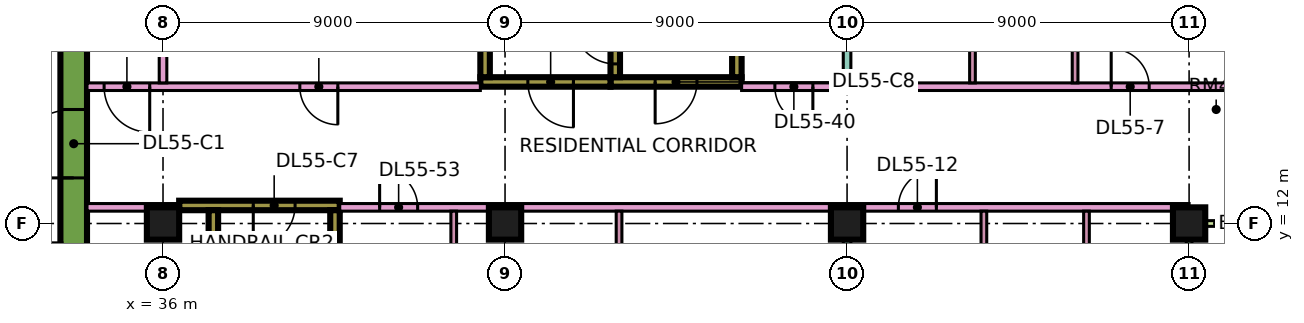
"""IFC4 building model, lengths in metres.
Left out: names, types, materials, properties, quantities, classifications, styles, units other than length and angle.
Written with IfcOpenShell. Run it as: python <this file> out.ifc"""

import sys

from ifc_helpers import new_model, si_unit, direction, frame, frame_2d, origin, origin_2d, place, context, subcontext, project, spatial, rectangle, extrude, element, fill, save


model = new_model("IFC4")
c1 = context("Model", 3, precision=1e-05, world=origin(), true_north=direction((0.0, 1.0)))
c2 = subcontext(c1, "Body", "Model", "MODEL_VIEW")
j1 = project(units=[si_unit("LENGTHUNIT", "METRE"), si_unit("PLANEANGLEUNIT", "RADIAN")], contexts=[c1])
p1 = place(None, origin())
s1 = spatial("IfcSite", under=j1, at=p1, CompositionType="ELEMENT")
p2 = place(p1, origin())
s2 = spatial("IfcBuilding", under=s1, at=p2, CompositionType="ELEMENT")
p3 = place(p2, frame((0.0, 0.0, 234.15)))
s3 = spatial("IfcBuildingStorey", under=s2, at=p3, CompositionType="ELEMENT", Elevation=234.15)
for number, where, z_axis, x_axis in (
    (1, (36.0, 12.0, 0.0), (0.0, 0.0, 1.0), (1.0, 0.0, 0.0)),
    (2, (45.0, 12.0, 0.0), (0.0, 0.0, 1.0), (1.0, 0.0, 0.0)),
    (3, (54.0, 12.0, 0.0), (0.0, 0.0, 1.0), (1.0, 0.0, 0.0)),
    (4, (63.0, 12.0, 0.0), (0.0, 0.0, 1.0), (1.0, 0.0, 0.0)),
):
    element("IfcColumn", number, at=place(p3, frame(where, z_axis=z_axis, x_axis=x_axis)), inside=s3, PredefinedType="COLUMN", context=c2, shape_type="SweptSolid", body=[
        extrude(rectangle(XDim=0.85, YDim=0.85, at=origin_2d()), origin(), (0.0, 0.0, 1.0), 3.75),
    ])
p4 = place(p3, frame((33.65, 7.7, 0.0), z_axis=(0.0, 0.0, 1.0), x_axis=(0.0, 1.0, 0.0)))
e5 = element("IfcWall", 5, at=p4, inside=s3, PredefinedType="SHEAR", context=c2, shape_type="SweptSolid", body=[
    extrude(rectangle(XDim=11.6, YDim=0.7, at=frame_2d((5.8, 0.0))), origin(), (0.0, 0.0, 1.0), 3.75),
])
p5 = place(p4, frame((5.5, 0.0, 0.0)))
e6 = element("IfcOpeningElement", 6, at=p5, cuts=e5, PredefinedType="OPENING", context=c2, shape_type="SweptSolid", body=[
    extrude(rectangle(XDim=1.8, YDim=2.4, at=frame_2d((0.9, 1.2))), frame((0.0, 0.36, 0.0), z_axis=(0.0, -1.0, 0.0), x_axis=(1.0, 0.0, 0.0)), (0.0, 0.0, 1.0), 0.72),
])
p6 = place(p3, frame((36.425, 12.475, 0.0), z_axis=(0.0, 0.0, 1.0), x_axis=(1.0, 0.0, 0.0)))
e7 = element("IfcWall", 7, at=p6, inside=s3, PredefinedType="SHEAR", context=c2, shape_type="SweptSolid", body=[
    extrude(rectangle(XDim=4.225, YDim=0.25, at=frame_2d((2.112, 0.0))), origin(), (0.0, 0.0, 1.0), 3.75),
])
p7 = place(p6, frame((1.95, 0.0, 0.0)))
e8 = element("IfcOpeningElement", 8, at=p7, cuts=e7, PredefinedType="OPENING", context=c2, shape_type="SweptSolid", body=[
    extrude(rectangle(XDim=1.1, YDim=2.2, at=frame_2d((0.55, 1.1))), frame((0.0, 0.135, 0.0), z_axis=(0.0, -1.0, 0.0), x_axis=(1.0, 0.0, 0.0)), (0.0, 0.0, 1.0), 0.27),
])
for number, where, z_axis, x_axis in (
    (9, (37.325, 5.85, 0.0), (0.0, 0.0, 1.0), (0.0, 1.0, 0.0)),
    (10, (40.525, 5.85, 0.0), (0.0, 0.0, 1.0), (0.0, 1.0, 0.0)),
):
    element("IfcWall", number, at=place(p3, frame(where, z_axis=z_axis, x_axis=x_axis)), inside=s3, PredefinedType="SHEAR", context=c2, shape_type="SweptSolid", body=[
        extrude(rectangle(XDim=6.5, YDim=0.25, at=frame_2d((3.25, 0.0))), origin(), (0.0, 0.0, 1.0), 3.75),
    ])
p8 = place(p3, frame((47.775, 15.725, 0.0), z_axis=(0.0, 0.0, 1.0), x_axis=(1.0, 0.0, 0.0)))
e11 = element("IfcWall", 11, at=p8, inside=s3, PredefinedType="SHEAR", context=c2, shape_type="SweptSolid", body=[
    extrude(rectangle(XDim=3.45, YDim=0.25, at=frame_2d((1.725, 0.0))), origin(), (0.0, 0.0, 1.0), 3.75),
])
p9 = place(p8, frame((1.175, 0.0, 0.0)))
e12 = element("IfcOpeningElement", 12, at=p9, cuts=e11, PredefinedType="OPENING", context=c2, shape_type="SweptSolid", body=[
    extrude(rectangle(XDim=1.1, YDim=2.2, at=frame_2d((0.55, 1.1))), frame((0.0, 0.135, 0.0), z_axis=(0.0, -1.0, 0.0), x_axis=(1.0, 0.0, 0.0)), (0.0, 0.0, 1.0), 0.27),
])
p10 = place(p3, frame((47.9, 15.85, 0.0), z_axis=(0.0, 0.0, 1.0), x_axis=(0.0, 1.0, 0.0)))
e13 = element("IfcWall", 13, at=p10, inside=s3, PredefinedType="SHEAR", context=c2, shape_type="SweptSolid", body=[
    extrude(rectangle(XDim=6.5, YDim=0.25, at=frame_2d((3.25, 0.0))), origin(), (0.0, 0.0, 1.0), 3.75),
])
p11 = place(p10, frame((0.35, 0.0, 0.0)))
e14 = element("IfcOpeningElement", 14, at=p11, cuts=e13, PredefinedType="OPENING", context=c2, shape_type="SweptSolid", body=[
    extrude(rectangle(XDim=1.1, YDim=2.2, at=frame_2d((0.55, 1.1))), frame((0.0, 0.135, 0.0), z_axis=(0.0, -1.0, 0.0), x_axis=(1.0, 0.0, 0.0)), (0.0, 0.0, 1.0), 0.27),
])
p12 = place(p3, frame((51.1, 15.85, 0.0), z_axis=(0.0, 0.0, 1.0), x_axis=(0.0, 1.0, 0.0)))
e15 = element("IfcWall", 15, at=p12, inside=s3, PredefinedType="SHEAR", context=c2, shape_type="SweptSolid", body=[
    extrude(rectangle(XDim=6.5, YDim=0.25, at=frame_2d((3.25, 0.0))), origin(), (0.0, 0.0, 1.0), 3.75),
])
p13 = place(p3, frame((44.35, 15.725, 0.0), z_axis=(0.0, 0.0, 1.0), x_axis=(1.0, 0.0, 0.0)))
e16 = element("IfcWall", 16, at=p13, inside=s3, PredefinedType="SHEAR", context=c2, shape_type="SweptSolid", body=[
    extrude(rectangle(XDim=3.425, YDim=0.25, at=frame_2d((1.712, 0.0))), origin(), (0.0, 0.0, 1.0), 3.75),
])
p14 = place(p13, frame((1.25, 0.0, 0.0)))
e17 = element("IfcOpeningElement", 17, at=p14, cuts=e16, PredefinedType="OPENING", context=c2, shape_type="SweptSolid", body=[
    extrude(rectangle(XDim=1.2, YDim=2.2, at=frame_2d((0.6, 1.1))), frame((0.0, 0.135, 0.0), z_axis=(0.0, -1.0, 0.0), x_axis=(1.0, 0.0, 0.0)), (0.0, 0.0, 1.0), 0.27),
])
p15 = place(p3, frame((44.475, 15.85, 0.0), z_axis=(0.0, 0.0, 1.0), x_axis=(0.0, 1.0, 0.0)))
e18 = element("IfcWall", 18, at=p15, inside=s3, PredefinedType="SHEAR", context=c2, shape_type="SweptSolid", body=[
    extrude(rectangle(XDim=6.5, YDim=0.25, at=frame_2d((3.25, 0.0))), origin(), (0.0, 0.0, 1.0), 3.75),
])
p16 = place(p15, frame((1.75, 0.0, 0.0)))
e19 = element("IfcOpeningElement", 19, at=p16, cuts=e18, PredefinedType="OPENING", context=c2, shape_type="SweptSolid", body=[
    extrude(rectangle(XDim=1.1, YDim=2.2, at=frame_2d((0.55, 1.1))), frame((0.0, 0.135, 0.0), z_axis=(0.0, -1.0, 0.0), x_axis=(1.0, 0.0, 0.0)), (0.0, 0.0, 1.0), 0.27),
])
p17 = place(p15, frame((4.3, 0.0, 0.0)))
e20 = element("IfcOpeningElement", 20, at=p17, cuts=e18, PredefinedType="OPENING", context=c2, shape_type="SweptSolid", body=[
    extrude(rectangle(XDim=1.1, YDim=2.2, at=frame_2d((0.55, 1.1))), frame((0.0, 0.135, 0.0), z_axis=(0.0, -1.0, 0.0), x_axis=(1.0, 0.0, 0.0)), (0.0, 0.0, 1.0), 0.27),
])
p18 = place(p3, frame((63.0, 1.575, 0.0), z_axis=(0.0, 0.0, 1.0), x_axis=(0.0, 1.0, 0.0)))
e21 = element("IfcWall", 21, at=p18, inside=s3, PredefinedType="SOLIDWALL", context=c2, shape_type="SweptSolid", body=[
    extrude(rectangle(XDim=10.35, YDim=0.15, at=frame_2d((5.175, 0.0))), origin(), (0.0, 0.0, 1.0), 3.35),
])
p19 = place(p18, frame((2.425, 0.0, 0.0)))
e22 = element("IfcOpeningElement", 22, at=p19, cuts=e21, PredefinedType="OPENING", context=c2, shape_type="SweptSolid", body=[
    extrude(rectangle(XDim=1.8, YDim=2.4, at=frame_2d((0.9, 1.2))), frame((0.0, 0.085, 0.0), z_axis=(0.0, -1.0, 0.0), x_axis=(1.0, 0.0, 0.0)), (0.0, 0.0, 1.0), 0.17),
])
p20 = place(p18, frame((7.075, 0.0, 0.45)))
e23 = element("IfcOpeningElement", 23, at=p20, cuts=e21, PredefinedType="OPENING", context=c2, shape_type="SweptSolid", body=[
    extrude(rectangle(XDim=2.4, YDim=2.4, at=frame_2d((1.2, 1.2))), frame((0.0, 0.085, 0.0), z_axis=(0.0, -1.0, 0.0), x_axis=(1.0, 0.0, 0.0)), (0.0, 0.0, 1.0), 0.17),
])
p21 = place(p3, frame((64.5, 12.0, 0.0), z_axis=(0.0, 0.0, 1.0), x_axis=(-1.0, 0.0, 0.0)))
e24 = element("IfcWall", 24, at=p21, inside=s3, PredefinedType="SOLIDWALL", context=c2, shape_type="SweptSolid", body=[
    extrude(rectangle(XDim=1.5, YDim=0.15, at=frame_2d((0.75, 0.0))), origin(), (0.0, 0.0, 1.0), 3.35),
])
p22 = place(p3, frame((34.0, 12.425, 0.0), z_axis=(0.0, 0.0, 1.0), x_axis=(1.0, 0.0, 0.0)))
e25 = element("IfcWall", 25, at=p22, inside=s3, PredefinedType="PARTITIONING", context=c2, shape_type="SweptSolid", body=[
    extrude(rectangle(XDim=2.426, YDim=0.2, at=frame_2d((1.213, 0.0))), origin(), (0.0, 0.0, 1.0), 3.35),
])
p23 = place(p3, frame((34.0, 15.6, 0.0), z_axis=(0.0, 0.0, 1.0), x_axis=(1.0, 0.0, 0.0)))
e26 = element("IfcWall", 26, at=p23, inside=s3, PredefinedType="PARTITIONING", context=c2, shape_type="SweptSolid", body=[
    extrude(rectangle(XDim=10.35, YDim=0.2, at=frame_2d((5.175, 0.0))), origin(), (0.0, 0.0, 1.0), 3.35),
])
p24 = place(p23, frame((5.6, 0.0, 0.0)))
e27 = element("IfcOpeningElement", 27, at=p24, cuts=e26, PredefinedType="OPENING", context=c2, shape_type="SweptSolid", body=[
    extrude(rectangle(XDim=1.0, YDim=2.1, at=frame_2d((0.5, 1.05))), frame((0.0, 0.11, 0.0), z_axis=(0.0, -1.0, 0.0), x_axis=(1.0, 0.0, 0.0)), (0.0, 0.0, 1.0), 0.22),
])
p25 = place(p23, frame((0.45, 0.0, 0.0)))
e28 = element("IfcOpeningElement", 28, at=p25, cuts=e26, PredefinedType="OPENING", context=c2, shape_type="SweptSolid", body=[
    extrude(rectangle(XDim=1.2, YDim=2.1, at=frame_2d((0.6, 1.05))), frame((0.0, 0.11, 0.0), z_axis=(0.0, -1.0, 0.0), x_axis=(1.0, 0.0, 0.0)), (0.0, 0.0, 1.0), 0.22),
])
p26 = place(p3, frame((36.0, 15.7, 0.0), z_axis=(0.0, 0.0, 1.0), x_axis=(0.0, 1.0, 0.0)))
e29 = element("IfcWall", 29, at=p26, inside=s3, PredefinedType="PARTITIONING", context=c2, shape_type="SweptSolid", body=[
    extrude(rectangle(XDim=8.3, YDim=0.2, at=frame_2d((4.15, 0.0))), origin(), (0.0, 0.0, 1.0), 3.35),
])
p27 = place(p3, frame((40.65, 12.425, 0.0), z_axis=(0.0, 0.0, 1.0), x_axis=(1.0, 0.0, 0.0)))
e30 = element("IfcWall", 30, at=p27, inside=s3, PredefinedType="PARTITIONING", context=c2, shape_type="SweptSolid", body=[
    extrude(rectangle(XDim=22.35, YDim=0.2, at=frame_2d((11.175, 0.0))), origin(), (0.0, 0.0, 1.0), 3.35),
])
p28 = place(p27, frame((14.7, 0.0, 0.0)))
e31 = element("IfcOpeningElement", 31, at=p28, cuts=e30, PredefinedType="OPENING", context=c2, shape_type="SweptSolid", body=[
    extrude(rectangle(XDim=1.0, YDim=2.1, at=frame_2d((0.5, 1.05))), frame((0.0, 0.11, 0.0), z_axis=(0.0, -1.0, 0.0), x_axis=(1.0, 0.0, 0.0)), (0.0, 0.0, 1.0), 0.22),
])
p29 = place(p27, frame((1.05, 0.0, 0.0)))
e32 = element("IfcOpeningElement", 32, at=p29, cuts=e30, PredefinedType="OPENING", context=c2, shape_type="SweptSolid", body=[
    extrude(rectangle(XDim=1.0, YDim=2.1, at=frame_2d((0.5, 1.05))), frame((0.0, 0.11, 0.0), z_axis=(0.0, -1.0, 0.0), x_axis=(1.0, 0.0, 0.0)), (0.0, 0.0, 1.0), 0.22),
])
p30 = place(p3, frame((43.65, 5.975, 0.0), z_axis=(0.0, 0.0, 1.0), x_axis=(0.0, 1.0, 0.0)))
e33 = element("IfcWall", 33, at=p30, inside=s3, PredefinedType="PARTITIONING", context=c2, shape_type="SweptSolid", body=[
    extrude(rectangle(XDim=6.35, YDim=0.15, at=frame_2d((3.175, 0.0))), origin(), (0.0, 0.0, 1.0), 3.35),
])
p31 = place(p30, frame((4.275, 0.0, 0.0)))
e34 = element("IfcOpeningElement", 34, at=p31, cuts=e33, PredefinedType="OPENING", context=c2, shape_type="SweptSolid", body=[
    extrude(rectangle(XDim=0.9, YDim=2.1, at=frame_2d((0.45, 1.05))), frame((0.0, 0.085, 0.0), z_axis=(0.0, -1.0, 0.0), x_axis=(1.0, 0.0, 0.0)), (0.0, 0.0, 1.0), 0.17),
])
p32 = place(p3, frame((48.0, 5.975, 0.0), z_axis=(0.0, 0.0, 1.0), x_axis=(0.0, 1.0, 0.0)))
e35 = element("IfcWall", 35, at=p32, inside=s3, PredefinedType="PARTITIONING", context=c2, shape_type="SweptSolid", body=[
    extrude(rectangle(XDim=6.35, YDim=0.15, at=frame_2d((3.175, 0.0))), origin(), (0.0, 0.0, 1.0), 3.35),
])
p33 = place(p3, frame((51.225, 15.6, 0.0), z_axis=(0.0, 0.0, 1.0), x_axis=(1.0, 0.0, 0.0)))
e36 = element("IfcWall", 36, at=p33, inside=s3, PredefinedType="PARTITIONING", context=c2, shape_type="SweptSolid", body=[
    extrude(rectangle(XDim=13.125, YDim=0.2, at=frame_2d((6.562, 0.0))), origin(), (0.0, 0.0, 1.0), 3.35),
])
p34 = place(p33, frame((9.725, 0.0, 0.0)))
e37 = element("IfcOpeningElement", 37, at=p34, cuts=e36, PredefinedType="OPENING", context=c2, shape_type="SweptSolid", body=[
    extrude(rectangle(XDim=1.0, YDim=2.1, at=frame_2d((0.5, 1.05))), frame((0.0, 0.11, 0.0), z_axis=(0.0, -1.0, 0.0), x_axis=(1.0, 0.0, 0.0)), (0.0, 0.0, 1.0), 0.22),
])
p35 = place(p33, frame((0.875, 0.0, 0.0)))
e38 = element("IfcOpeningElement", 38, at=p35, cuts=e36, PredefinedType="OPENING", context=c2, shape_type="SweptSolid", body=[
    extrude(rectangle(XDim=1.0, YDim=2.1, at=frame_2d((0.5, 1.05))), frame((0.0, 0.11, 0.0), z_axis=(0.0, -1.0, 0.0), x_axis=(1.0, 0.0, 0.0)), (0.0, 0.0, 1.0), 0.22),
])
p36 = place(p3, frame((54.0, 0.074, 0.0), z_axis=(0.0, 0.0, 1.0), x_axis=(0.0, 1.0, 0.0)))
e39 = element("IfcWall", 39, at=p36, inside=s3, PredefinedType="PARTITIONING", context=c2, shape_type="SweptSolid", body=[
    extrude(rectangle(XDim=12.251, YDim=0.2, at=frame_2d((6.125, 0.0))), origin(), (0.0, 0.0, 1.0), 3.35),
])
p37 = place(p3, frame((54.0, 15.7, 0.0), z_axis=(0.0, 0.0, 1.0), x_axis=(0.0, 1.0, 0.0)))
e40 = element("IfcWall", 40, at=p37, inside=s3, PredefinedType="PARTITIONING", context=c2, shape_type="SweptSolid", body=[
    extrude(rectangle(XDim=8.226, YDim=0.2, at=frame_2d((4.113, 0.0))), origin(), (0.0, 0.0, 1.0), 3.35),
])
p38 = place(p3, frame((57.3, 15.7, 0.0), z_axis=(0.0, 0.0, 1.0), x_axis=(0.0, 1.0, 0.0)))
e41 = element("IfcWall", 41, at=p38, inside=s3, PredefinedType="PARTITIONING", context=c2, shape_type="SweptSolid", body=[
    extrude(rectangle(XDim=3.125, YDim=0.15, at=frame_2d((1.562, 0.0))), origin(), (0.0, 0.0, 1.0), 3.35),
])
p39 = place(p3, frame((57.6, 8.3, 0.0), z_axis=(0.0, 0.0, 1.0), x_axis=(0.0, 1.0, 0.0)))
e42 = element("IfcWall", 42, at=p39, inside=s3, PredefinedType="PARTITIONING", context=c2, shape_type="SweptSolid", body=[
    extrude(rectangle(XDim=4.025, YDim=0.15, at=frame_2d((2.012, 0.0))), origin(), (0.0, 0.0, 1.0), 3.35),
])
p40 = place(p3, frame((60.0, 15.7, 0.0), z_axis=(0.0, 0.0, 1.0), x_axis=(0.0, 1.0, 0.0)))
e43 = element("IfcWall", 43, at=p40, inside=s3, PredefinedType="PARTITIONING", context=c2, shape_type="SweptSolid", body=[
    extrude(rectangle(XDim=3.125, YDim=0.15, at=frame_2d((1.562, 0.0))), origin(), (0.0, 0.0, 1.0), 3.35),
])
p41 = place(p40, frame((1.2, 0.0, 0.0)))
e44 = element("IfcOpeningElement", 44, at=p41, cuts=e43, PredefinedType="OPENING", context=c2, shape_type="SweptSolid", body=[
    extrude(rectangle(XDim=0.8, YDim=2.1, at=frame_2d((0.4, 1.05))), frame((0.0, 0.085, 0.0), z_axis=(0.0, -1.0, 0.0), x_axis=(1.0, 0.0, 0.0)), (0.0, 0.0, 1.0), 0.17),
])
p42 = place(p3, frame((60.3, 8.3, 0.0), z_axis=(0.0, 0.0, 1.0), x_axis=(0.0, 1.0, 0.0)))
e45 = element("IfcWall", 45, at=p42, inside=s3, PredefinedType="PARTITIONING", context=c2, shape_type="SweptSolid", body=[
    extrude(rectangle(XDim=4.025, YDim=0.15, at=frame_2d((2.012, 0.0))), origin(), (0.0, 0.0, 1.0), 3.35),
])
p43 = place(p5, origin())
e46 = element("IfcDoor", 46, at=p43, inside=s3, OperationType="DOUBLE_DOOR_SINGLE_SWING", PredefinedType="DOOR", context=c2, shape_type="SweptSolid", body=[
    extrude(rectangle(XDim=1.8, YDim=2.4, at=frame_2d((0.9, 1.2))), frame((0.0, 0.025, 0.0), z_axis=(0.0, -1.0, 0.0), x_axis=(1.0, 0.0, 0.0)), (0.0, 0.0, 1.0), 0.05),
])
fill(e6, e46)
p44 = place(p7, frame((1.1, 0.0, 0.0), z_axis=(0.0, 0.0, 1.0), x_axis=(-1.0, 0.0, 0.0)))
e47 = element("IfcDoor", 47, at=p44, inside=s3, OperationType="SINGLE_SWING_LEFT", PredefinedType="DOOR", context=c2, shape_type="SweptSolid", body=[
    extrude(rectangle(XDim=1.1, YDim=2.2, at=frame_2d((0.55, 1.1))), frame((0.0, 0.025, 0.0), z_axis=(0.0, -1.0, 0.0), x_axis=(1.0, 0.0, 0.0)), (0.0, 0.0, 1.0), 0.05),
])
fill(e8, e47)
p45 = place(p9, frame((1.1, 0.0, 0.0), z_axis=(0.0, 0.0, 1.0), x_axis=(-1.0, 0.0, 0.0)))
e48 = element("IfcDoor", 48, at=p45, inside=s3, OperationType="SINGLE_SWING_LEFT", PredefinedType="DOOR", context=c2, shape_type="SweptSolid", body=[
    extrude(rectangle(XDim=1.1, YDim=2.2, at=frame_2d((0.55, 1.1))), frame((0.0, 0.025, 0.0), z_axis=(0.0, -1.0, 0.0), x_axis=(1.0, 0.0, 0.0)), (0.0, 0.0, 1.0), 0.05),
])
fill(e12, e48)
p46 = place(p14, origin())
e49 = element("IfcDoor", 49, at=p46, inside=s3, OperationType="SINGLE_SWING_RIGHT", PredefinedType="DOOR", context=c2, shape_type="SweptSolid", body=[
    extrude(rectangle(XDim=1.2, YDim=2.2, at=frame_2d((0.6, 1.1))), frame((0.0, 0.025, 0.0), z_axis=(0.0, -1.0, 0.0), x_axis=(1.0, 0.0, 0.0)), (0.0, 0.0, 1.0), 0.05),
])
fill(e17, e49)
p47 = place(p11, frame((1.1, 0.0, 0.0), z_axis=(0.0, 0.0, 1.0), x_axis=(-1.0, 0.0, 0.0)))
e50 = element("IfcDoor", 50, at=p47, inside=s3, OperationType="SINGLE_SWING_RIGHT", PredefinedType="DOOR", context=c2, shape_type="SweptSolid", body=[
    extrude(rectangle(XDim=1.1, YDim=2.2, at=frame_2d((0.55, 1.1))), frame((0.0, 0.025, 0.0), z_axis=(0.0, -1.0, 0.0), x_axis=(1.0, 0.0, 0.0)), (0.0, 0.0, 1.0), 0.05),
])
fill(e14, e50)
p48 = place(p24, origin())
e51 = element("IfcDoor", 51, at=p48, inside=s3, OperationType="SINGLE_SWING_RIGHT", PredefinedType="DOOR", context=c2, shape_type="SweptSolid", body=[
    extrude(rectangle(XDim=1.0, YDim=2.1, at=frame_2d((0.5, 1.05))), frame((0.0, 0.025, 0.0), z_axis=(0.0, -1.0, 0.0), x_axis=(1.0, 0.0, 0.0)), (0.0, 0.0, 1.0), 0.05),
])
fill(e27, e51)
p49 = place(p34, origin())
e52 = element("IfcDoor", 52, at=p49, inside=s3, OperationType="SINGLE_SWING_LEFT", PredefinedType="DOOR", context=c2, shape_type="SweptSolid", body=[
    extrude(rectangle(XDim=1.0, YDim=2.1, at=frame_2d((0.5, 1.05))), frame((0.0, 0.025, 0.0), z_axis=(0.0, -1.0, 0.0), x_axis=(1.0, 0.0, 0.0)), (0.0, 0.0, 1.0), 0.05),
])
fill(e37, e52)
p50 = place(p28, frame((1.0, 0.0, 0.0), z_axis=(0.0, 0.0, 1.0), x_axis=(-1.0, 0.0, 0.0)))
e53 = element("IfcDoor", 53, at=p50, inside=s3, OperationType="SINGLE_SWING_RIGHT", PredefinedType="DOOR", context=c2, shape_type="SweptSolid", body=[
    extrude(rectangle(XDim=1.0, YDim=2.1, at=frame_2d((0.5, 1.05))), frame((0.0, 0.025, 0.0), z_axis=(0.0, -1.0, 0.0), x_axis=(1.0, 0.0, 0.0)), (0.0, 0.0, 1.0), 0.05),
])
fill(e31, e53)
p51 = place(p25, origin())
e54 = element("IfcDoor", 54, at=p51, inside=s3, OperationType="SINGLE_SWING_RIGHT", PredefinedType="DOOR", context=c2, shape_type="SweptSolid", body=[
    extrude(rectangle(XDim=1.2, YDim=2.1, at=frame_2d((0.6, 1.05))), frame((0.0, 0.025, 0.0), z_axis=(0.0, -1.0, 0.0), x_axis=(1.0, 0.0, 0.0)), (0.0, 0.0, 1.0), 0.05),
])
fill(e28, e54)
p52 = place(p35, origin())
e55 = element("IfcDoor", 55, at=p52, inside=s3, OperationType="SINGLE_SWING_RIGHT", PredefinedType="DOOR", context=c2, shape_type="SweptSolid", body=[
    extrude(rectangle(XDim=1.0, YDim=2.1, at=frame_2d((0.5, 1.05))), frame((0.0, 0.025, 0.0), z_axis=(0.0, -1.0, 0.0), x_axis=(1.0, 0.0, 0.0)), (0.0, 0.0, 1.0), 0.05),
])
fill(e38, e55)
p53 = place(p29, origin())
e56 = element("IfcDoor", 56, at=p53, inside=s3, OperationType="SINGLE_SWING_LEFT", PredefinedType="DOOR", context=c2, shape_type="SweptSolid", body=[
    extrude(rectangle(XDim=1.0, YDim=2.1, at=frame_2d((0.5, 1.05))), frame((0.0, 0.025, 0.0), z_axis=(0.0, -1.0, 0.0), x_axis=(1.0, 0.0, 0.0)), (0.0, 0.0, 1.0), 0.05),
])
fill(e32, e56)
save(model, sys.argv[1])
